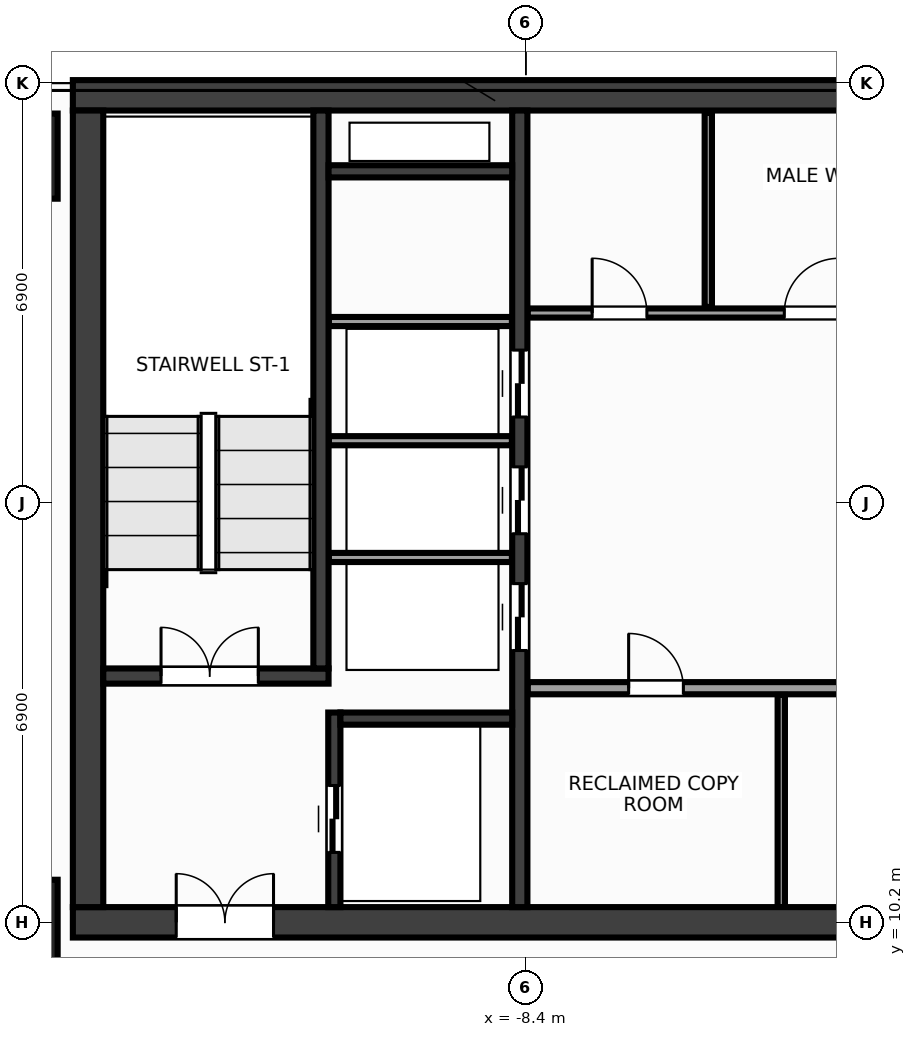
"""IFC4 building model, lengths in metres.
Left out: names, types, materials, properties, quantities, classifications, styles, units other than length and angle.
Written with IfcOpenShell. Run it as: python <this file> out.ifc"""

import sys

from ifc_helpers import new_model, si_unit, direction, frame, frame_2d, origin, origin_2d, place, context, subcontext, project, spatial, rectangle, extrude, source, transform, mapped, element, fill, save


model = new_model("IFC4")
c1 = context("Model", 3, precision=1e-05, world=origin(), true_north=direction((0.0, 1.0)))
c2 = subcontext(c1, "Body", "Model", "MODEL_VIEW")
j1 = project(units=[si_unit("LENGTHUNIT", "METRE"), si_unit("PLANEANGLEUNIT", "RADIAN")], contexts=[c1])
p1 = place(None, origin())
s1 = spatial("IfcSite", under=j1, at=p1, CompositionType="ELEMENT")
p2 = place(p1, origin())
s2 = spatial("IfcBuilding", under=s1, at=p2, CompositionType="ELEMENT")
p3 = place(p2, frame((0.0, 0.0, 214.4)))
s3 = spatial("IfcBuildingStorey", under=s2, at=p3, CompositionType="ELEMENT", Elevation=214.4)
m1 = source(origin(), c2, "Body", "SweptSolid", [
    extrude(rectangle(XDim=31.7, YDim=0.5, at=frame_2d((15.85, 0.0))), origin(), (0.0, 0.0, 1.0), 3.6),
])
p4 = place(p3, frame((-15.85, 23.8, 0.0), z_axis=(0.0, 0.0, 1.0), x_axis=(1.0, 0.0, 0.0)))
e1 = element("IfcWall", 1, at=p4, inside=s3, PredefinedType="SHEAR", context=c2, shape_type="MappedRepresentation", body=[
    mapped(m1, transform((0.0, 0.0, 0.0), x_axis=(1.0, 0.0, 0.0), y_axis=(0.0, 1.0, 0.0), z_axis=(0.0, 0.0, 1.0), scale=1.0)),
])
p5 = place(p3, frame((-15.85, 10.2, 0.0), z_axis=(0.0, 0.0, 1.0), x_axis=(1.0, 0.0, 0.0)))
e2 = element("IfcWall", 2, at=p5, inside=s3, PredefinedType="SHEAR", context=c2, shape_type="MappedRepresentation", body=[
    mapped(m1, transform((0.0, 0.0, 0.0), x_axis=(1.0, 0.0, 0.0), y_axis=(0.0, 1.0, 0.0), z_axis=(0.0, 0.0, 1.0), scale=1.0)),
])
p6 = place(p5, frame((1.7, 0.0, 0.0)))
e3 = element("IfcOpeningElement", 3, at=p6, cuts=e2, PredefinedType="OPENING", context=c2, shape_type="SweptSolid", body=[
    extrude(rectangle(XDim=1.6, YDim=2.15, at=frame_2d((0.8, 1.075))), frame((0.0, 0.262, 0.0), z_axis=(0.0, -1.0, 0.0), x_axis=(1.0, 0.0, 0.0)), (0.0, 0.0, 1.0), 0.524),
])
p7 = place(p5, frame((28.4, 0.0, 0.0)))
e4 = element("IfcOpeningElement", 4, at=p7, cuts=e2, PredefinedType="OPENING", context=c2, shape_type="SweptSolid", body=[
    extrude(rectangle(XDim=1.6, YDim=2.15, at=frame_2d((0.8, 1.075))), frame((0.0, 0.262, 0.0), z_axis=(0.0, -1.0, 0.0), x_axis=(1.0, 0.0, 0.0)), (0.0, 0.0, 1.0), 0.524),
])
p8 = place(p5, frame((15.1, 0.0, 0.0)))
e5 = element("IfcOpeningElement", 5, at=p8, cuts=e2, PredefinedType="OPENING", context=c2, shape_type="SweptSolid", body=[
    extrude(rectangle(XDim=1.5, YDim=2.2, at=frame_2d((0.75, 1.1))), frame((0.0, 0.262, 0.0), z_axis=(0.0, -1.0, 0.0), x_axis=(1.0, 0.0, 0.0)), (0.0, 0.0, 1.0), 0.524),
])
m2 = source(origin(), c2, "Body", "SweptSolid", [
    extrude(rectangle(XDim=13.1, YDim=0.5, at=frame_2d((6.55, 0.0))), origin(), (0.0, 0.0, 1.0), 3.6),
])
p9 = place(p3, frame((-15.6, 10.45, 0.0), z_axis=(0.0, 0.0, 1.0), x_axis=(0.0, 1.0, 0.0)))
e6 = element("IfcWall", 6, at=p9, inside=s3, PredefinedType="SHEAR", context=c2, shape_type="MappedRepresentation", body=[
    mapped(m2, transform((0.0, 0.0, 0.0), x_axis=(1.0, 0.0, 0.0), y_axis=(0.0, 1.0, 0.0), z_axis=(0.0, 0.0, 1.0), scale=1.0)),
])
m3 = source(origin(), c2, "Body", "SweptSolid", [
    extrude(rectangle(XDim=13.1, YDim=0.25, at=frame_2d((6.55, 0.0))), origin(), (0.0, 0.0, 1.0), 3.6),
])
p10 = place(p3, frame((-8.5, 10.45, 0.0), z_axis=(0.0, 0.0, 1.0), x_axis=(0.0, 1.0, 0.0)))
e7 = element("IfcWall", 7, at=p10, inside=s3, PredefinedType="SHEAR", context=c2, shape_type="MappedRepresentation", body=[
    mapped(m3, transform((0.0, 0.0, 0.0), x_axis=(1.0, 0.0, 0.0), y_axis=(0.0, 1.0, 0.0), z_axis=(0.0, 0.0, 1.0), scale=1.0)),
])
p11 = place(p10, frame((4.22, 0.0, 0.0)))
e8 = element("IfcOpeningElement", 8, at=p11, cuts=e7, PredefinedType="OPENING", context=c2, shape_type="SweptSolid", body=[
    extrude(rectangle(XDim=1.1, YDim=2.15, at=frame_2d((0.55, 1.075))), frame((0.0, 0.137, 0.0), z_axis=(0.0, -1.0, 0.0), x_axis=(1.0, 0.0, 0.0)), (0.0, 0.0, 1.0), 0.274),
])
p12 = place(p10, frame((6.14, 0.0, 0.0)))
e9 = element("IfcOpeningElement", 9, at=p12, cuts=e7, PredefinedType="OPENING", context=c2, shape_type="SweptSolid", body=[
    extrude(rectangle(XDim=1.1, YDim=2.15, at=frame_2d((0.55, 1.075))), frame((0.0, 0.137, 0.0), z_axis=(0.0, -1.0, 0.0), x_axis=(1.0, 0.0, 0.0)), (0.0, 0.0, 1.0), 0.274),
])
p13 = place(p10, frame((8.06, 0.0, 0.0)))
e10 = element("IfcOpeningElement", 10, at=p13, cuts=e7, PredefinedType="OPENING", context=c2, shape_type="SweptSolid", body=[
    extrude(rectangle(XDim=1.1, YDim=2.15, at=frame_2d((0.55, 1.075))), frame((0.0, 0.137, 0.0), z_axis=(0.0, -1.0, 0.0), x_axis=(1.0, 0.0, 0.0)), (0.0, 0.0, 1.0), 0.274),
])
m4 = source(origin(), c2, "Body", "SweptSolid", [
    extrude(rectangle(XDim=3.705, YDim=0.25, at=frame_2d((1.853, 0.0))), origin(), (0.0, 0.0, 1.0), 3.6),
])
p14 = place(p3, frame((-15.35, 14.25, 0.0), z_axis=(0.0, 0.0, 1.0), x_axis=(1.0, 0.0, 0.0)))
e11 = element("IfcWall", 11, at=p14, inside=s3, PredefinedType="SHEAR", context=c2, shape_type="MappedRepresentation", body=[
    mapped(m4, transform((0.0, 0.0, 0.0), x_axis=(1.0, 0.0, 0.0), y_axis=(0.0, 1.0, 0.0), z_axis=(0.0, 0.0, 1.0), scale=1.0)),
])
p15 = place(p14, frame((0.95, 0.0, 0.0)))
e12 = element("IfcOpeningElement", 12, at=p15, cuts=e11, PredefinedType="OPENING", context=c2, shape_type="SweptSolid", body=[
    extrude(rectangle(XDim=1.6, YDim=2.15, at=frame_2d((0.8, 1.075))), frame((0.0, 0.137, 0.0), z_axis=(0.0, -1.0, 0.0), x_axis=(1.0, 0.0, 0.0)), (0.0, 0.0, 1.0), 0.274),
])
m5 = source(origin(), c2, "Body", "SweptSolid", [
    extrude(rectangle(XDim=9.175, YDim=0.25, at=frame_2d((4.587, 0.0))), origin(), (0.0, 0.0, 1.0), 3.6),
])
p16 = place(p3, frame((-11.77, 14.375, 0.0), z_axis=(0.0, 0.0, 1.0), x_axis=(0.0, 1.0, 0.0)))
e13 = element("IfcWall", 13, at=p16, inside=s3, PredefinedType="SHEAR", context=c2, shape_type="MappedRepresentation", body=[
    mapped(m5, transform((0.0, 0.0, 0.0), x_axis=(1.0, 0.0, 0.0), y_axis=(0.0, 1.0, 0.0), z_axis=(0.0, 0.0, 1.0), scale=1.0)),
])
m6 = source(origin(), c2, "Body", "SweptSolid", [
    extrude(rectangle(XDim=3.2, YDim=0.2, at=frame_2d((1.6, 0.0))), origin(), (0.0, 0.0, 1.0), 3.6),
])
p17 = place(p3, frame((-11.55, 10.45, 0.0), z_axis=(0.0, 0.0, 1.0), x_axis=(0.0, 1.0, 0.0)))
e14 = element("IfcWall", 14, at=p17, inside=s3, PredefinedType="SHEAR", context=c2, shape_type="MappedRepresentation", body=[
    mapped(m6, transform((0.0, 0.0, 0.0), x_axis=(1.0, 0.0, 0.0), y_axis=(0.0, 1.0, 0.0), z_axis=(0.0, 0.0, 1.0), scale=1.0)),
])
p18 = place(p17, frame((0.9, 0.0, 0.0)))
e15 = element("IfcOpeningElement", 15, at=p18, cuts=e14, PredefinedType="OPENING", context=c2, shape_type="SweptSolid", body=[
    extrude(rectangle(XDim=1.1, YDim=2.15, at=frame_2d((0.55, 1.075))), frame((0.0, 0.112, 0.0), z_axis=(0.0, -1.0, 0.0), x_axis=(1.0, 0.0, 0.0)), (0.0, 0.0, 1.0), 0.224),
])
m7 = source(origin(), c2, "Body", "SweptSolid", [
    extrude(rectangle(XDim=2.825, YDim=0.2, at=frame_2d((1.413, 0.0))), origin(), (0.0, 0.0, 1.0), 3.6),
])
p19 = place(p3, frame((-11.45, 13.55, 0.0), z_axis=(0.0, 0.0, 1.0), x_axis=(1.0, 0.0, 0.0)))
e16 = element("IfcWall", 16, at=p19, inside=s3, PredefinedType="SHEAR", context=c2, shape_type="MappedRepresentation", body=[
    mapped(m7, transform((0.0, 0.0, 0.0), x_axis=(1.0, 0.0, 0.0), y_axis=(0.0, 1.0, 0.0), z_axis=(0.0, 0.0, 1.0), scale=1.0)),
])
m8 = source(origin(), c2, "Body", "SweptSolid", [
    extrude(rectangle(XDim=3.02, YDim=0.2, at=frame_2d((1.51, 0.0))), origin(), (0.0, 0.0, 1.0), 3.6),
])
p20 = place(p3, frame((-11.645, 22.55, 0.0), z_axis=(0.0, 0.0, 1.0), x_axis=(1.0, 0.0, 0.0)))
e17 = element("IfcWall", 17, at=p20, inside=s3, PredefinedType="SHEAR", context=c2, shape_type="MappedRepresentation", body=[
    mapped(m8, transform((0.0, 0.0, 0.0), x_axis=(1.0, 0.0, 0.0), y_axis=(0.0, 1.0, 0.0), z_axis=(0.0, 0.0, 1.0), scale=1.0)),
])
m9 = source(origin(), c2, "Body", "SweptSolid", [
    extrude(rectangle(XDim=1.4, YDim=1.4, at=origin_2d()), origin(), (0.0, 0.0, 1.0), 3.6),
])
for number, where, z_axis, x_axis in (
    (18, (-16.8, 10.2, 0.0), (0.0, 0.0, 1.0), (1.0, 0.0, 0.0)),
    (19, (-16.8, 22.8, 0.0), (0.0, 0.0, 1.0), (1.0, 0.0, 0.0)),
):
    element("IfcColumn", number, at=place(p3, frame(where, z_axis=z_axis, x_axis=x_axis)), inside=s3, PredefinedType="COLUMN", context=c2, shape_type="MappedRepresentation", body=[
        mapped(m9, transform((0.0, 0.0, 0.0), x_axis=(1.0, 0.0, 0.0), y_axis=(0.0, 1.0, 0.0), z_axis=(0.0, 0.0, 1.0), scale=1.0)),
    ])
m10 = source(origin(), c2, "Body", "SweptSolid", [
    extrude(rectangle(XDim=3.01, YDim=0.15, at=frame_2d((1.505, 0.0))), origin(), (0.0, 0.0, 1.0), 3.38),
])
for number, where, z_axis, x_axis in (
    (20, (-11.64, 16.2, 0.0), (0.0, 0.0, 1.0), (1.0, 0.0, 0.0)),
    (21, (-11.64, 18.12, 0.0), (0.0, 0.0, 1.0), (1.0, 0.0, 0.0)),
    (22, (-11.64, 20.08, 0.0), (0.0, 0.0, 1.0), (1.0, 0.0, 0.0)),
):
    element("IfcWall", number, at=place(p3, frame(where, z_axis=z_axis, x_axis=x_axis)), inside=s3, PredefinedType="PARTITIONING", context=c2, shape_type="MappedRepresentation", body=[
        mapped(m10, transform((0.0, 0.0, 0.0), x_axis=(1.0, 0.0, 0.0), y_axis=(0.0, 1.0, 0.0), z_axis=(0.0, 0.0, 1.0), scale=1.0)),
    ])
m11 = source(origin(), c2, "Body", "SweptSolid", [
    extrude(rectangle(XDim=7.07, YDim=0.2, at=frame_2d((3.535, 0.0))), origin(), (0.0, 0.0, 1.0), 3.38),
])
p21 = place(p3, frame((-8.37, 14.05, 0.0), z_axis=(0.0, 0.0, 1.0), x_axis=(1.0, 0.0, 0.0)))
e23 = element("IfcWall", 23, at=p21, inside=s3, PredefinedType="PARTITIONING", context=c2, shape_type="MappedRepresentation", body=[
    mapped(m11, transform((0.0, 0.0, 0.0), x_axis=(1.0, 0.0, 0.0), y_axis=(0.0, 1.0, 0.0), z_axis=(0.0, 0.0, 1.0), scale=1.0)),
])
p22 = place(p21, frame((1.66, 0.0, 0.0)))
e24 = element("IfcOpeningElement", 24, at=p22, cuts=e23, PredefinedType="OPENING", context=c2, shape_type="SweptSolid", body=[
    extrude(rectangle(XDim=0.9, YDim=2.15, at=frame_2d((0.45, 1.075))), frame((0.0, 0.112, 0.0), z_axis=(0.0, -1.0, 0.0), x_axis=(1.0, 0.0, 0.0)), (0.0, 0.0, 1.0), 0.224),
])
p23 = place(p21, frame((5.11, 0.0, 0.0)))
e25 = element("IfcOpeningElement", 25, at=p23, cuts=e23, PredefinedType="OPENING", context=c2, shape_type="SweptSolid", body=[
    extrude(rectangle(XDim=0.9, YDim=2.15, at=frame_2d((0.45, 1.075))), frame((0.0, 0.112, 0.0), z_axis=(0.0, -1.0, 0.0), x_axis=(1.0, 0.0, 0.0)), (0.0, 0.0, 1.0), 0.224),
])
m12 = source(origin(), c2, "Body", "SweptSolid", [
    extrude(rectangle(XDim=14.59, YDim=0.15, at=frame_2d((7.295, 0.0))), origin(), (0.0, 0.0, 1.0), 3.38),
])
p24 = place(p3, frame((-8.37, 20.22, 0.0), z_axis=(0.0, 0.0, 1.0), x_axis=(1.0, 0.0, 0.0)))
e26 = element("IfcWall", 26, at=p24, inside=s3, PredefinedType="PARTITIONING", context=c2, shape_type="MappedRepresentation", body=[
    mapped(m12, transform((0.0, 0.0, 0.0), x_axis=(1.0, 0.0, 0.0), y_axis=(0.0, 1.0, 0.0), z_axis=(0.0, 0.0, 1.0), scale=1.0)),
])
p25 = place(p24, frame((1.06, 0.0, 0.0)))
e27 = element("IfcOpeningElement", 27, at=p25, cuts=e26, PredefinedType="OPENING", context=c2, shape_type="SweptSolid", body=[
    extrude(rectangle(XDim=0.9, YDim=2.15, at=frame_2d((0.45, 1.075))), frame((0.0, 0.087, 0.0), z_axis=(0.0, -1.0, 0.0), x_axis=(1.0, 0.0, 0.0)), (0.0, 0.0, 1.0), 0.174),
])
p26 = place(p24, frame((4.22, 0.0, 0.0)))
e28 = element("IfcOpeningElement", 28, at=p26, cuts=e26, PredefinedType="OPENING", context=c2, shape_type="SweptSolid", body=[
    extrude(rectangle(XDim=0.9, YDim=2.15, at=frame_2d((0.45, 1.075))), frame((0.0, 0.087, 0.0), z_axis=(0.0, -1.0, 0.0), x_axis=(1.0, 0.0, 0.0)), (0.0, 0.0, 1.0), 0.174),
])
p27 = place(p24, frame((7.82, 0.0, 0.0)))
e29 = element("IfcOpeningElement", 29, at=p27, cuts=e26, PredefinedType="OPENING", context=c2, shape_type="SweptSolid", body=[
    extrude(rectangle(XDim=0.9, YDim=2.15, at=frame_2d((0.45, 1.075))), frame((0.0, 0.087, 0.0), z_axis=(0.0, -1.0, 0.0), x_axis=(1.0, 0.0, 0.0)), (0.0, 0.0, 1.0), 0.174),
])
p28 = place(p24, frame((11.87, 0.0, 0.0)))
e30 = element("IfcOpeningElement", 30, at=p28, cuts=e26, PredefinedType="OPENING", context=c2, shape_type="SweptSolid", body=[
    extrude(rectangle(XDim=0.9, YDim=2.15, at=frame_2d((0.45, 1.075))), frame((0.0, 0.087, 0.0), z_axis=(0.0, -1.0, 0.0), x_axis=(1.0, 0.0, 0.0)), (0.0, 0.0, 1.0), 0.174),
])
m13 = source(origin(), c2, "Body", "SweptSolid", [
    extrude(rectangle(XDim=3.49, YDim=0.12, at=frame_2d((1.745, 0.0))), origin(), (0.0, 0.0, 1.0), 3.38),
])
p29 = place(p3, frame((-4.2, 10.45, 0.0), z_axis=(0.0, 0.0, 1.0), x_axis=(0.0, 1.0, 0.0)))
e31 = element("IfcWall", 31, at=p29, inside=s3, PredefinedType="PARTITIONING", context=c2, shape_type="MappedRepresentation", body=[
    mapped(m13, transform((0.0, 0.0, 0.0), x_axis=(1.0, 0.0, 0.0), y_axis=(0.0, 1.0, 0.0), z_axis=(0.0, 0.0, 1.0), scale=1.0)),
])
m14 = source(origin(), c2, "Body", "SweptSolid", [
    extrude(rectangle(XDim=3.19, YDim=0.12, at=frame_2d((1.595, 0.0))), origin(), (0.0, 0.0, 1.0), 3.38),
])
p30 = place(p3, frame((-5.4, 20.32, 0.0), z_axis=(0.0, 0.0, 1.0), x_axis=(0.0, 1.0, 0.0)))
e32 = element("IfcWall", 32, at=p30, inside=s3, PredefinedType="PARTITIONING", context=c2, shape_type="MappedRepresentation", body=[
    mapped(m14, transform((0.0, 0.0, 0.0), x_axis=(1.0, 0.0, 0.0), y_axis=(0.0, 1.0, 0.0), z_axis=(0.0, 0.0, 1.0), scale=1.0)),
])
m15 = source(origin(), c2, "Body", "SweptSolid", [
    extrude(rectangle(XDim=1.6, YDim=2.15, at=frame_2d((0.8, 1.075))), frame((0.0, 0.025, 0.0), z_axis=(0.0, -1.0, 0.0), x_axis=(1.0, 0.0, 0.0)), (0.0, 0.0, 1.0), 0.05),
])
p31 = place(p15, origin())
e33 = element("IfcDoor", 33, at=p31, inside=s3, OperationType="DOUBLE_DOOR_SINGLE_SWING", PredefinedType="DOOR", context=c2, shape_type="MappedRepresentation", body=[
    mapped(m15, transform((0.0, 0.0, 0.0), x_axis=(1.0, 0.0, 0.0), y_axis=(0.0, 1.0, 0.0), z_axis=(0.0, 0.0, 1.0), scale=1.0)),
])
fill(e12, e33)
p32 = place(p6, origin())
e34 = element("IfcDoor", 34, at=p32, inside=s3, OperationType="DOUBLE_DOOR_SINGLE_SWING", PredefinedType="DOOR", context=c2, shape_type="MappedRepresentation", body=[
    mapped(m15, transform((0.0, 0.0, 0.0), x_axis=(1.0, 0.0, 0.0), y_axis=(0.0, 1.0, 0.0), z_axis=(0.0, 0.0, 1.0), scale=1.0)),
])
fill(e3, e34)
m16 = source(origin(), c2, "Body", "SweptSolid", [
    extrude(rectangle(XDim=1.1, YDim=2.15, at=frame_2d((0.55, 1.075))), frame((0.0, 0.025, 0.0), z_axis=(0.0, -1.0, 0.0), x_axis=(1.0, 0.0, 0.0)), (0.0, 0.0, 1.0), 0.05),
])
p33 = place(p18, origin())
e35 = element("IfcDoor", 35, at=p33, inside=s3, OperationType="DOUBLE_DOOR_SLIDING", PredefinedType="DOOR", context=c2, shape_type="MappedRepresentation", body=[
    mapped(m16, transform((0.0, 0.0, 0.0), x_axis=(1.0, 0.0, 0.0), y_axis=(0.0, 1.0, 0.0), z_axis=(0.0, 0.0, 1.0), scale=1.0)),
])
fill(e15, e35)
p34 = place(p11, origin())
e36 = element("IfcDoor", 36, at=p34, inside=s3, OperationType="DOUBLE_DOOR_SLIDING", PredefinedType="DOOR", context=c2, shape_type="MappedRepresentation", body=[
    mapped(m16, transform((0.0, 0.0, 0.0), x_axis=(1.0, 0.0, 0.0), y_axis=(0.0, 1.0, 0.0), z_axis=(0.0, 0.0, 1.0), scale=1.0)),
])
fill(e8, e36)
p35 = place(p12, origin())
e37 = element("IfcDoor", 37, at=p35, inside=s3, OperationType="DOUBLE_DOOR_SLIDING", PredefinedType="DOOR", context=c2, shape_type="MappedRepresentation", body=[
    mapped(m16, transform((0.0, 0.0, 0.0), x_axis=(1.0, 0.0, 0.0), y_axis=(0.0, 1.0, 0.0), z_axis=(0.0, 0.0, 1.0), scale=1.0)),
])
fill(e9, e37)
p36 = place(p13, origin())
e38 = element("IfcDoor", 38, at=p36, inside=s3, OperationType="DOUBLE_DOOR_SLIDING", PredefinedType="DOOR", context=c2, shape_type="MappedRepresentation", body=[
    mapped(m16, transform((0.0, 0.0, 0.0), x_axis=(1.0, 0.0, 0.0), y_axis=(0.0, 1.0, 0.0), z_axis=(0.0, 0.0, 1.0), scale=1.0)),
])
fill(e10, e38)
m17 = source(origin(), c2, "Body", "SweptSolid", [
    extrude(rectangle(XDim=0.9, YDim=2.15, at=frame_2d((0.45, 1.075))), frame((0.0, 0.025, 0.0), z_axis=(0.0, -1.0, 0.0), x_axis=(1.0, 0.0, 0.0)), (0.0, 0.0, 1.0), 0.05),
])
p37 = place(p22, origin())
e39 = element("IfcDoor", 39, at=p37, inside=s3, OperationType="SINGLE_SWING_LEFT", PredefinedType="DOOR", context=c2, shape_type="MappedRepresentation", body=[
    mapped(m17, transform((0.0, 0.0, 0.0), x_axis=(1.0, 0.0, 0.0), y_axis=(0.0, 1.0, 0.0), z_axis=(0.0, 0.0, 1.0), scale=1.0)),
])
fill(e24, e39)
p38 = place(p25, origin())
e40 = element("IfcDoor", 40, at=p38, inside=s3, OperationType="SINGLE_SWING_LEFT", PredefinedType="DOOR", context=c2, shape_type="MappedRepresentation", body=[
    mapped(m17, transform((0.0, 0.0, 0.0), x_axis=(1.0, 0.0, 0.0), y_axis=(0.0, 1.0, 0.0), z_axis=(0.0, 0.0, 1.0), scale=1.0)),
])
fill(e27, e40)
p39 = place(p26, origin())
e41 = element("IfcDoor", 41, at=p39, inside=s3, OperationType="SINGLE_SWING_RIGHT", PredefinedType="DOOR", context=c2, shape_type="MappedRepresentation", body=[
    mapped(m17, transform((0.0, 0.0, 0.0), x_axis=(1.0, 0.0, 0.0), y_axis=(0.0, 1.0, 0.0), z_axis=(0.0, 0.0, 1.0), scale=1.0)),
])
fill(e28, e41)
save(model, sys.argv[1])
